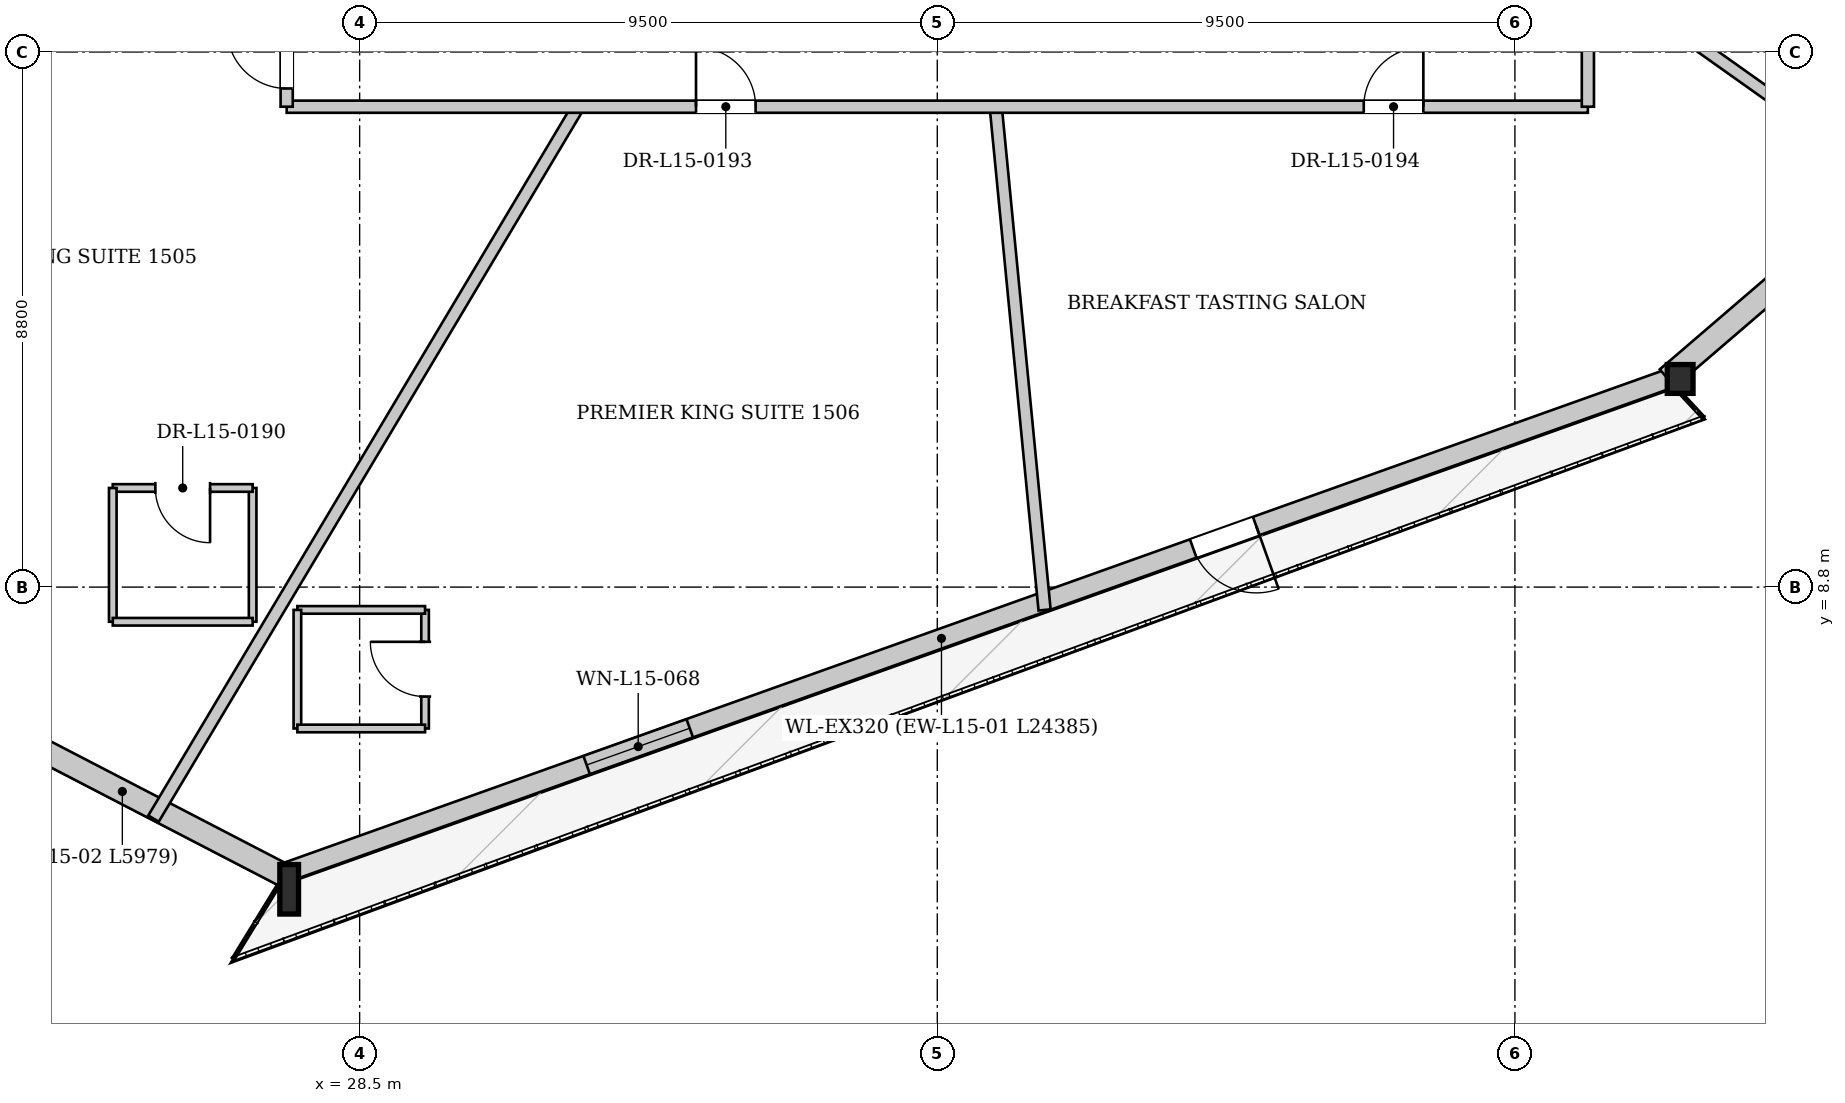
"""IFC4 building model, lengths in metres.
Left out: names, types, materials, properties, quantities, classifications, styles, units other than length and angle.
Written with IfcOpenShell. Run it as: python <this file> out.ifc"""

import sys

from ifc_helpers import new_model, si_unit, direction, frame, frame_2d, origin, origin_2d, place, context, subcontext, project, spatial, rectangle, i_section, extrude, source, transform, mapped, element, fill, save


model = new_model("IFC4")
c1 = context("Model", 3, precision=1e-05, world=origin(), true_north=direction((0.0, 1.0)))
c2 = subcontext(c1, "Body", "Model", "MODEL_VIEW")
j1 = project(units=[si_unit("LENGTHUNIT", "METRE"), si_unit("PLANEANGLEUNIT", "RADIAN")], contexts=[c1])
p1 = place(None, origin())
s1 = spatial("IfcSite", under=j1, at=p1, CompositionType="ELEMENT")
p2 = place(p1, origin())
s2 = spatial("IfcBuilding", under=s1, at=p2, CompositionType="ELEMENT")
p3 = place(p2, frame((0.0, 0.0, 61.25)))
s3 = spatial("IfcBuildingStorey", under=s2, at=p3, CompositionType="ELEMENT", Elevation=61.25)
m1 = source(origin(), c2, "Body", "SweptSolid", [
    extrude(i_section(OverallWidth=0.308, OverallDepth=0.814, WebThickness=0.021, FlangeThickness=0.04, at=origin_2d()), origin(), (0.0, 0.0, 1.0), 3.406),
])
p4 = place(p3, frame((27.164, 3.894, 0.0), z_axis=(0.10408048476, -0.037704087454, 0.993853940215), x_axis=(0.340599003824, 0.940208656945, 0.0)))
e1 = element("IfcColumn", 1, at=p4, inside=s3, PredefinedType="COLUMN", context=c2, shape_type="MappedRepresentation", body=[
    mapped(m1, transform((0.0, 0.0, 0.0), x_axis=(1.0, 0.0, 0.0), y_axis=(0.0, 1.0, 0.0), z_axis=(0.0, 0.0, 1.0), scale=1.0)),
])
m2 = source(origin(), c2, "Body", "SweptSolid", [
    extrude(i_section(OverallWidth=0.424, OverallDepth=0.474, WebThickness=0.043, FlangeThickness=0.068, at=origin_2d()), origin(), (0.0, 0.0, 1.0), 3.4),
])
p5 = place(p3, frame((50.13, 12.092, 0.0), z_axis=(0.051634204665, 0.076912702637, 0.995699927228), x_axis=(-0.830257005704, 0.557380753596, 0.0)))
e2 = element("IfcColumn", 2, at=p5, inside=s3, PredefinedType="COLUMN", context=c2, shape_type="MappedRepresentation", body=[
    mapped(m2, transform((0.0, 0.0, 0.0), x_axis=(1.0, 0.0, 0.0), y_axis=(0.0, 1.0, 0.0), z_axis=(0.0, 0.0, 1.0), scale=1.0)),
])
p6 = place(p3, frame((50.076, 12.243, 0.0), z_axis=(0.0, 0.0, 1.0), x_axis=(-0.941799205237, -0.33617593164, 0.0)))
e3 = element("IfcWall", 3, at=p6, inside=s3, PredefinedType="SOLIDWALL", context=c2, shape_type="SweptSolid", body=[
    extrude(rectangle(XDim=24.385, YDim=0.32, at=frame_2d((12.193, 0.0))), origin(), (0.0, 0.0, 1.0), 2.592),
])
p7 = place(p6, frame((7.253, 0.0, 0.0)))
e4 = element("IfcOpeningElement", 4, at=p7, cuts=e3, PredefinedType="OPENING", context=c2, shape_type="SweptSolid", body=[
    extrude(rectangle(XDim=1.1, YDim=2.3, at=frame_2d((0.55, 1.15))), frame((0.0, 0.17, 0.0), z_axis=(0.0, -1.0, 0.0), x_axis=(1.0, 0.0, 0.0)), (0.0, 0.0, 1.0), 0.34),
])
p8 = place(p6, frame((17.145, 0.0, 0.272)))
e5 = element("IfcOpeningElement", 5, at=p8, cuts=e3, PredefinedType="OPENING", context=c2, shape_type="SweptSolid", body=[
    extrude(rectangle(XDim=1.8, YDim=2.2, at=frame_2d((0.9, 1.1))), frame((0.0, 0.17, 0.0), z_axis=(0.0, -1.0, 0.0), x_axis=(1.0, 0.0, 0.0)), (0.0, 0.0, 1.0), 0.34),
])
p9 = place(p3, frame((27.251, 4.063, 0.0), z_axis=(0.0, 0.0, 1.0), x_axis=(-0.887815090673, 0.46020035286, 0.0)))
e6 = element("IfcWall", 6, at=p9, inside=s3, PredefinedType="SOLIDWALL", context=c2, shape_type="SweptSolid", body=[
    extrude(rectangle(XDim=5.979, YDim=0.38, at=frame_2d((2.989, 0.0))), origin(), (0.0, 0.0, 1.0), 2.592),
])
p10 = place(p3, frame((68.506, 28.123, 0.0), z_axis=(0.0, 0.0, 1.0), x_axis=(-0.758642837259, -0.651506750139, 0.0)))
e7 = element("IfcWall", 7, at=p10, inside=s3, PredefinedType="SOLIDWALL", context=c2, shape_type="SweptSolid", body=[
    extrude(rectangle(XDim=24.385, YDim=0.38, at=frame_2d((12.193, 0.0))), origin(), (0.0, 0.0, 1.0), 2.592),
])
p11 = place(p10, frame((6.228, 0.0, 0.65)))
e8 = element("IfcOpeningElement", 8, at=p11, cuts=e7, PredefinedType="OPENING", context=c2, shape_type="SweptSolid", body=[
    extrude(rectangle(XDim=1.2, YDim=1.5, at=frame_2d((0.6, 0.75))), frame((0.0, 0.2, 0.0), z_axis=(0.0, -1.0, 0.0), x_axis=(1.0, 0.0, 0.0)), (0.0, 0.0, 1.0), 0.4),
])
p12 = place(p10, frame((16.957, 0.0, 0.65)))
e9 = element("IfcOpeningElement", 9, at=p12, cuts=e7, PredefinedType="OPENING", context=c2, shape_type="SweptSolid", body=[
    extrude(rectangle(XDim=1.2, YDim=1.5, at=frame_2d((0.6, 0.75))), frame((0.0, 0.2, 0.0), z_axis=(0.0, -1.0, 0.0), x_axis=(1.0, 0.0, 0.0)), (0.0, 0.0, 1.0), 0.4),
])
p13 = place(p3, frame((32.094, 16.7, 0.0), z_axis=(0.0, 0.0, 1.0), x_axis=(-0.512323953294, -0.858792272253, 0.0)))
e10 = element("IfcWall", 10, at=p13, inside=s3, PredefinedType="PARTITIONING", context=c2, shape_type="SweptSolid", body=[
    extrude(rectangle(XDim=13.632, YDim=0.2, at=frame_2d((6.816, 0.0))), origin(), (0.0, 0.0, 1.0), 3.3),
])
p14 = place(p3, frame((38.961, 16.7, 0.0), z_axis=(0.0, 0.0, 1.0), x_axis=(0.096633864642, -0.995319996888, 0.0)))
e11 = element("IfcWall", 11, at=p14, inside=s3, PredefinedType="PARTITIONING", context=c2, shape_type="SweptSolid", body=[
    extrude(rectangle(XDim=8.314, YDim=0.2, at=frame_2d((4.157, 0.0))), origin(), (0.0, 0.0, 1.0), 3.3),
])
p15 = place(p3, frame((48.7, 19.006, 0.0), z_axis=(0.0, 0.0, 1.0), x_axis=(0.815508318328, -0.578745352239, 0.0)))
e12 = element("IfcWall", 12, at=p15, inside=s3, PredefinedType="PARTITIONING", context=c2, shape_type="SweptSolid", body=[
    extrude(rectangle(XDim=6.334, YDim=0.2, at=frame_2d((3.167, 0.0))), origin(), (0.0, 0.0, 1.0), 3.3),
])
p16 = place(p3, frame((26.74, 8.23, 0.0), z_axis=(0.0, 0.0, 1.0), x_axis=(0.0, 1.0, 0.0)))
e13 = element("IfcWall", 13, at=p16, inside=s3, PredefinedType="PARTITIONING", context=c2, shape_type="SweptSolid", body=[
    extrude(rectangle(XDim=2.2, YDim=0.125, at=frame_2d((1.1, 0.0))), origin(), (0.0, 0.0, 1.0), 3.3),
])
p17 = place(p3, frame((26.74, 10.43, 0.0), z_axis=(0.0, 0.0, 1.0), x_axis=(-1.0, 0.0, 0.0)))
e14 = element("IfcWall", 14, at=p17, inside=s3, PredefinedType="PARTITIONING", context=c2, shape_type="SweptSolid", body=[
    extrude(rectangle(XDim=2.3, YDim=0.125, at=frame_2d((1.15, 0.0))), origin(), (0.0, 0.0, 1.0), 3.3),
])
p18 = place(p17, frame((0.7, 0.0, 0.0)))
e15 = element("IfcOpeningElement", 15, at=p18, cuts=e14, PredefinedType="OPENING", context=c2, shape_type="SweptSolid", body=[
    extrude(rectangle(XDim=0.9, YDim=2.1, at=frame_2d((0.45, 1.05))), frame((0.0, 0.073, 0.0), z_axis=(0.0, -1.0, 0.0), x_axis=(1.0, 0.0, 0.0)), (0.0, 0.0, 1.0), 0.145),
])
p19 = place(p3, frame((24.44, 10.43, 0.0), z_axis=(0.0, 0.0, 1.0), x_axis=(0.0, -1.0, 0.0)))
e16 = element("IfcWall", 16, at=p19, inside=s3, PredefinedType="PARTITIONING", context=c2, shape_type="SweptSolid", body=[
    extrude(rectangle(XDim=2.2, YDim=0.125, at=frame_2d((1.1, 0.0))), origin(), (0.0, 0.0, 1.0), 3.3),
])
p20 = place(p3, frame((24.44, 8.23, 0.0), z_axis=(0.0, 0.0, 1.0), x_axis=(1.0, 0.0, 0.0)))
e17 = element("IfcWall", 17, at=p20, inside=s3, PredefinedType="PARTITIONING", context=c2, shape_type="SweptSolid", body=[
    extrude(rectangle(XDim=2.3, YDim=0.125, at=frame_2d((1.15, 0.0))), origin(), (0.0, 0.0, 1.0), 3.3),
])
p21 = place(p3, frame((29.576, 6.475, 0.0), z_axis=(0.0, 0.0, 1.0), x_axis=(0.0, 1.0, 0.0)))
e18 = element("IfcWall", 18, at=p21, inside=s3, PredefinedType="PARTITIONING", context=c2, shape_type="SweptSolid", body=[
    extrude(rectangle(XDim=1.95, YDim=0.125, at=frame_2d((0.975, 0.0))), origin(), (0.0, 0.0, 1.0), 2.795),
])
p22 = place(p21, frame((0.525, 0.0, 0.0)))
e19 = element("IfcOpeningElement", 19, at=p22, cuts=e18, PredefinedType="OPENING", context=c2, shape_type="SweptSolid", body=[
    extrude(rectangle(XDim=0.9, YDim=2.1, at=frame_2d((0.45, 1.05))), frame((0.0, 0.073, 0.0), z_axis=(0.0, -1.0, 0.0), x_axis=(1.0, 0.0, 0.0)), (0.0, 0.0, 1.0), 0.145),
])
p23 = place(p3, frame((29.576, 8.425, 0.0), z_axis=(0.0, 0.0, 1.0), x_axis=(-1.0, 0.0, 0.0)))
e20 = element("IfcWall", 20, at=p23, inside=s3, PredefinedType="PARTITIONING", context=c2, shape_type="SweptSolid", body=[
    extrude(rectangle(XDim=2.1, YDim=0.125, at=frame_2d((1.05, 0.0))), origin(), (0.0, 0.0, 1.0), 3.3),
])
p24 = place(p3, frame((27.476, 8.425, 0.0), z_axis=(0.0, 0.0, 1.0), x_axis=(0.0, -1.0, 0.0)))
e21 = element("IfcWall", 21, at=p24, inside=s3, PredefinedType="PARTITIONING", context=c2, shape_type="SweptSolid", body=[
    extrude(rectangle(XDim=1.95, YDim=0.125, at=frame_2d((0.975, 0.0))), origin(), (0.0, 0.0, 1.0), 3.3),
])
p25 = place(p3, frame((27.476, 6.475, 0.0), z_axis=(0.0, 0.0, 1.0), x_axis=(1.0, 0.0, 0.0)))
e22 = element("IfcWall", 22, at=p25, inside=s3, PredefinedType="PARTITIONING", context=c2, shape_type="SweptSolid", body=[
    extrude(rectangle(XDim=2.1, YDim=0.125, at=frame_2d((1.05, 0.0))), origin(), (0.0, 0.0, 1.0), 3.3),
])
p26 = place(p3, frame((27.3, 16.7, 0.0), z_axis=(0.0, 0.0, 1.0), x_axis=(1.0, 0.0, 0.0)))
e23 = element("IfcWall", 23, at=p26, inside=s3, PredefinedType="PARTITIONING", context=c2, shape_type="SweptSolid", body=[
    extrude(rectangle(XDim=21.4, YDim=0.2, at=frame_2d((10.7, 0.0))), origin(), (0.0, 0.0, 1.0), 3.3),
])
p27 = place(p26, frame((6.732, 0.0, 0.0)))
e24 = element("IfcOpeningElement", 24, at=p27, cuts=e23, PredefinedType="OPENING", context=c2, shape_type="SweptSolid", body=[
    extrude(rectangle(XDim=0.98, YDim=2.15, at=frame_2d((0.49, 1.075))), frame((0.0, 0.11, 0.0), z_axis=(0.0, -1.0, 0.0), x_axis=(1.0, 0.0, 0.0)), (0.0, 0.0, 1.0), 0.22),
])
p28 = place(p26, frame((17.714, 0.0, 0.0)))
e25 = element("IfcOpeningElement", 25, at=p28, cuts=e23, PredefinedType="OPENING", context=c2, shape_type="SweptSolid", body=[
    extrude(rectangle(XDim=0.98, YDim=2.15, at=frame_2d((0.49, 1.075))), frame((0.0, 0.11, 0.0), z_axis=(0.0, -1.0, 0.0), x_axis=(1.0, 0.0, 0.0)), (0.0, 0.0, 1.0), 0.22),
])
p29 = place(p3, frame((27.3, 16.7, 0.0), z_axis=(0.0, 0.0, 1.0), x_axis=(0.0, 1.0, 0.0)))
e26 = element("IfcWall", 26, at=p29, inside=s3, PredefinedType="PARTITIONING", context=c2, shape_type="SweptSolid", body=[
    extrude(rectangle(XDim=19.8, YDim=0.2, at=frame_2d((9.9, 0.0))), origin(), (0.0, 0.0, 1.0), 3.3),
])
p30 = place(p29, frame((18.52, 0.0, 0.0)))
e27 = element("IfcOpeningElement", 27, at=p30, cuts=e26, PredefinedType="OPENING", context=c2, shape_type="SweptSolid", body=[
    extrude(rectangle(XDim=0.98, YDim=2.15, at=frame_2d((0.49, 1.075))), frame((0.0, 0.11, 0.0), z_axis=(0.0, -1.0, 0.0), x_axis=(1.0, 0.0, 0.0)), (0.0, 0.0, 1.0), 0.22),
])
p31 = place(p29, frame((9.047, 0.0, 0.0)))
e28 = element("IfcOpeningElement", 28, at=p31, cuts=e26, PredefinedType="OPENING", context=c2, shape_type="SweptSolid", body=[
    extrude(rectangle(XDim=0.98, YDim=2.15, at=frame_2d((0.49, 1.075))), frame((0.0, 0.11, 0.0), z_axis=(0.0, -1.0, 0.0), x_axis=(1.0, 0.0, 0.0)), (0.0, 0.0, 1.0), 0.22),
])
p32 = place(p29, frame((0.3, 0.0, 0.0)))
e29 = element("IfcOpeningElement", 29, at=p32, cuts=e26, PredefinedType="OPENING", context=c2, shape_type="SweptSolid", body=[
    extrude(rectangle(XDim=0.98, YDim=2.15, at=frame_2d((0.49, 1.075))), frame((0.0, 0.11, 0.0), z_axis=(0.0, -1.0, 0.0), x_axis=(1.0, 0.0, 0.0)), (0.0, 0.0, 1.0), 0.22),
])
p33 = place(p3, frame((48.7, 16.7, 0.0), z_axis=(0.0, 0.0, 1.0), x_axis=(0.0, 1.0, 0.0)))
e30 = element("IfcWall", 30, at=p33, inside=s3, PredefinedType="PARTITIONING", context=c2, shape_type="SweptSolid", body=[
    extrude(rectangle(XDim=19.8, YDim=0.2, at=frame_2d((9.9, 0.0))), origin(), (0.0, 0.0, 1.0), 3.3),
])
p34 = place(p33, frame((6.378, 0.0, 0.0)))
e31 = element("IfcOpeningElement", 31, at=p34, cuts=e30, PredefinedType="OPENING", context=c2, shape_type="SweptSolid", body=[
    extrude(rectangle(XDim=0.98, YDim=2.15, at=frame_2d((0.49, 1.075))), frame((0.0, 0.11, 0.0), z_axis=(0.0, -1.0, 0.0), x_axis=(1.0, 0.0, 0.0)), (0.0, 0.0, 1.0), 0.22),
])
p35 = place(p33, frame((17.196, 0.0, 0.0)))
e32 = element("IfcOpeningElement", 32, at=p35, cuts=e30, PredefinedType="OPENING", context=c2, shape_type="SweptSolid", body=[
    extrude(rectangle(XDim=0.98, YDim=2.15, at=frame_2d((0.49, 1.075))), frame((0.0, 0.11, 0.0), z_axis=(0.0, -1.0, 0.0), x_axis=(1.0, 0.0, 0.0)), (0.0, 0.0, 1.0), 0.22),
])
m3 = source(origin(), c2, "Body", "SweptSolid", [
    extrude(rectangle(XDim=1.1, YDim=2.3, at=frame_2d((0.55, 1.15))), frame((0.0, 0.025, 0.0), z_axis=(0.0, -1.0, 0.0), x_axis=(1.0, 0.0, 0.0)), (0.0, 0.0, 1.0), 0.05),
])
p36 = place(p7, origin())
e33 = element("IfcDoor", 33, at=p36, inside=s3, OperationType="SINGLE_SWING_LEFT", PredefinedType="DOOR", context=c2, shape_type="MappedRepresentation", body=[
    mapped(m3, transform((0.0, 0.0, 0.0), x_axis=(1.0, 0.0, 0.0), y_axis=(0.0, 1.0, 0.0), z_axis=(0.0, 0.0, 1.0), scale=1.0)),
])
fill(e4, e33)
m4 = source(origin(), c2, "Body", "SweptSolid", [
    extrude(rectangle(XDim=1.8, YDim=2.2, at=frame_2d((0.9, 1.1))), frame((0.0, 0.03, 0.0), z_axis=(0.0, -1.0, 0.0), x_axis=(1.0, 0.0, 0.0)), (0.0, 0.0, 1.0), 0.06),
])
p37 = place(p8, origin())
e34 = element("IfcWindow", 34, at=p37, inside=s3, PartitioningType="SINGLE_PANEL", PredefinedType="WINDOW", context=c2, shape_type="MappedRepresentation", body=[
    mapped(m4, transform((0.0, 0.0, 0.0), x_axis=(1.0, 0.0, 0.0), y_axis=(0.0, 1.0, 0.0), z_axis=(0.0, 0.0, 1.0), scale=1.0)),
])
fill(e5, e34)
m5 = source(origin(), c2, "Body", "SweptSolid", [
    extrude(rectangle(XDim=0.9, YDim=2.1, at=frame_2d((0.45, 1.05))), frame((0.0, 0.025, 0.0), z_axis=(0.0, -1.0, 0.0), x_axis=(1.0, 0.0, 0.0)), (0.0, 0.0, 1.0), 0.05),
])
p38 = place(p18, origin())
e35 = element("IfcDoor", 35, at=p38, inside=s3, OperationType="SINGLE_SWING_LEFT", PredefinedType="DOOR", context=c2, shape_type="MappedRepresentation", body=[
    mapped(m5, transform((0.0, 0.0, 0.0), x_axis=(1.0, 0.0, 0.0), y_axis=(0.0, 1.0, 0.0), z_axis=(0.0, 0.0, 1.0), scale=1.0)),
])
fill(e15, e35)
p39 = place(p22, origin())
e36 = element("IfcDoor", 36, at=p39, inside=s3, OperationType="SINGLE_SWING_RIGHT", PredefinedType="DOOR", context=c2, shape_type="MappedRepresentation", body=[
    mapped(m5, transform((0.0, 0.0, 0.0), x_axis=(1.0, 0.0, 0.0), y_axis=(0.0, 1.0, 0.0), z_axis=(0.0, 0.0, 1.0), scale=1.0)),
])
fill(e19, e36)
m6 = source(origin(), c2, "Body", "SweptSolid", [
    extrude(rectangle(XDim=0.98, YDim=2.15, at=frame_2d((0.49, 1.075))), frame((0.0, 0.025, 0.0), z_axis=(0.0, -1.0, 0.0), x_axis=(1.0, 0.0, 0.0)), (0.0, 0.0, 1.0), 0.05),
])
p40 = place(p27, origin())
e37 = element("IfcDoor", 37, at=p40, inside=s3, OperationType="SINGLE_SWING_LEFT", PredefinedType="DOOR", context=c2, shape_type="MappedRepresentation", body=[
    mapped(m6, transform((0.0, 0.0, 0.0), x_axis=(1.0, 0.0, 0.0), y_axis=(0.0, 1.0, 0.0), z_axis=(0.0, 0.0, 1.0), scale=1.0)),
])
fill(e24, e37)
p41 = place(p28, origin())
e38 = element("IfcDoor", 38, at=p41, inside=s3, OperationType="SINGLE_SWING_RIGHT", PredefinedType="DOOR", context=c2, shape_type="MappedRepresentation", body=[
    mapped(m6, transform((0.0, 0.0, 0.0), x_axis=(1.0, 0.0, 0.0), y_axis=(0.0, 1.0, 0.0), z_axis=(0.0, 0.0, 1.0), scale=1.0)),
])
fill(e25, e38)
p42 = place(p32, origin())
e39 = element("IfcDoor", 39, at=p42, inside=s3, OperationType="SINGLE_SWING_RIGHT", PredefinedType="DOOR", context=c2, shape_type="MappedRepresentation", body=[
    mapped(m6, transform((0.0, 0.0, 0.0), x_axis=(1.0, 0.0, 0.0), y_axis=(0.0, 1.0, 0.0), z_axis=(0.0, 0.0, 1.0), scale=1.0)),
])
fill(e29, e39)
save(model, sys.argv[1])
